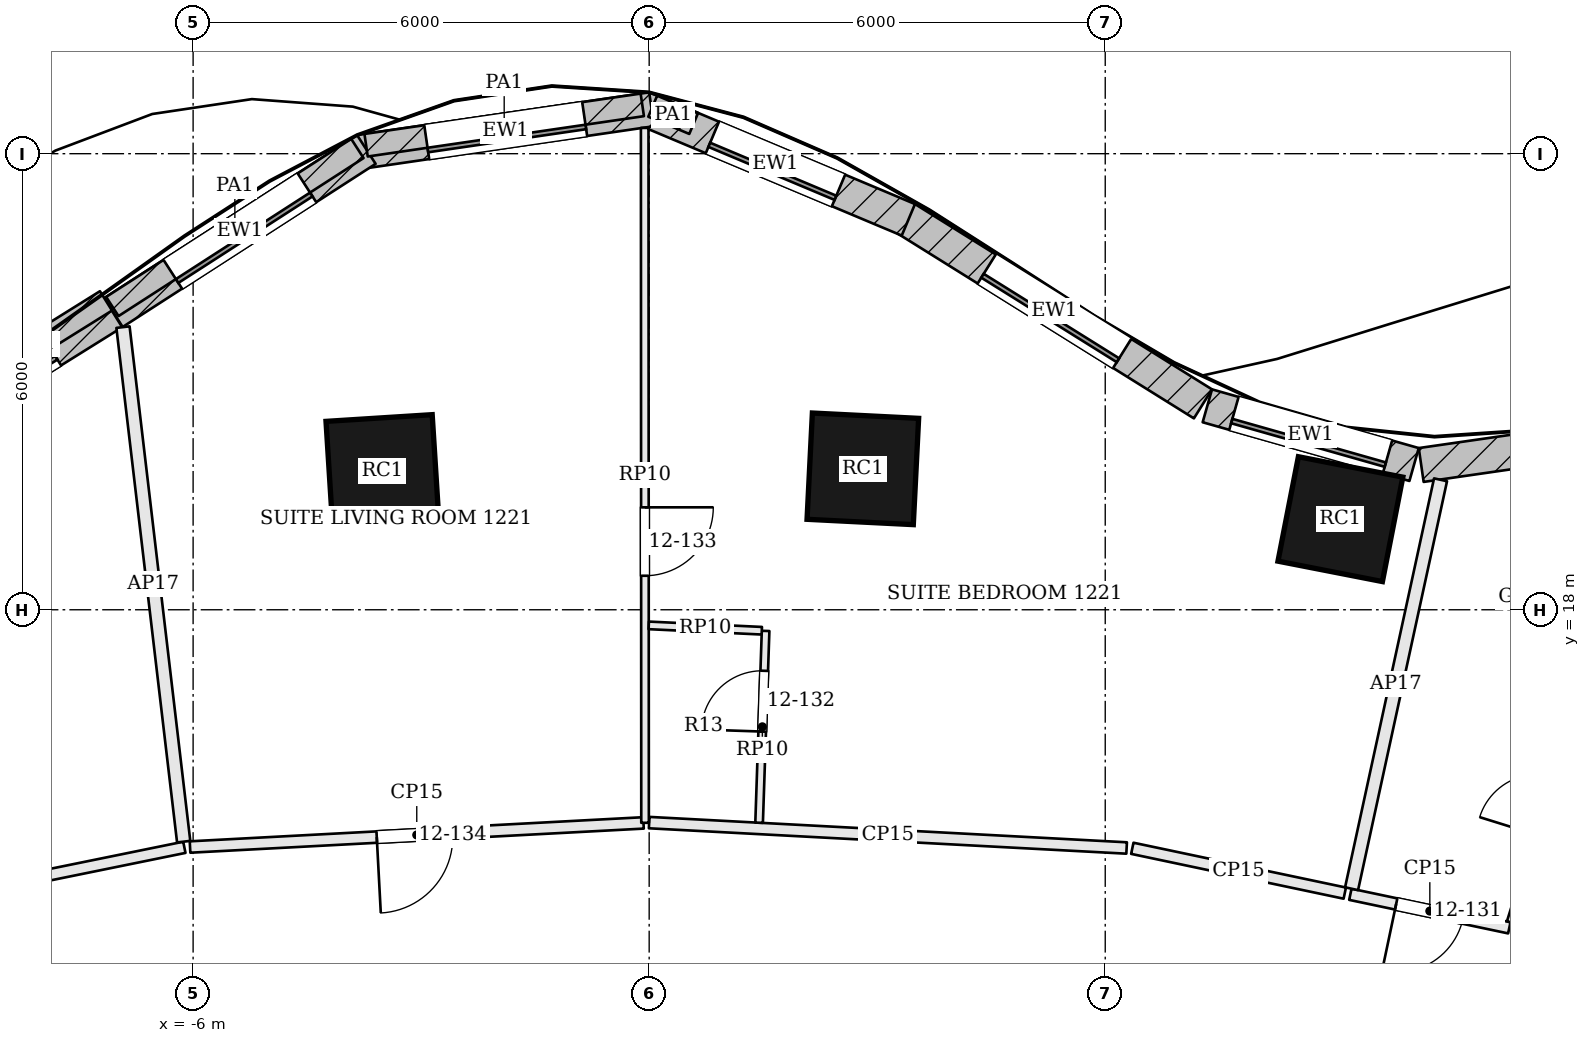
"""IFC4 building model, lengths in metres.
Left out: names, types, materials, properties, quantities, classifications, styles, units other than length and angle.
Written with IfcOpenShell. Run it as: python <this file> out.ifc"""

import sys

from ifc_helpers import new_model, si_unit, direction, frame, frame_2d, origin, origin_2d, place, context, subcontext, project, spatial, rectangle, extrude, element, fill, save


model = new_model("IFC4")
c1 = context("Model", 3, precision=1e-05, world=origin(), true_north=direction((0.0, 1.0)))
c2 = subcontext(c1, "Body", "Model", "MODEL_VIEW")
j1 = project(units=[si_unit("LENGTHUNIT", "METRE"), si_unit("PLANEANGLEUNIT", "RADIAN")], contexts=[c1])
p1 = place(None, origin())
s1 = spatial("IfcSite", under=j1, at=p1, CompositionType="ELEMENT")
p2 = place(p1, origin())
s2 = spatial("IfcBuilding", under=s1, at=p2, CompositionType="ELEMENT")
p3 = place(p2, frame((0.0, 0.0, 59.1)))
s3 = spatial("IfcBuildingStorey", under=s2, at=p3, CompositionType="ELEMENT", Elevation=59.1)
for number, where, z_axis, x_axis in (
    (1, (9.094, 19.192, 0.0), (0.0, 0.0, 1.0), (-0.981, 0.192, 0.0)),
    (2, (2.811, 19.854, 0.0), (0.0, 0.0, 1.0), (-0.999, 0.05, 0.0)),
    (3, (-3.509, 19.824, 0.0), (0.0, 0.0, 1.0), (-0.998, -0.063, 0.0)),
):
    element("IfcColumn", number, at=place(p3, frame(where, z_axis=z_axis, x_axis=x_axis)), inside=s3, PredefinedType="COLUMN", context=c2, shape_type="SweptSolid", body=[
        extrude(rectangle(XDim=1.4, YDim=1.4, at=origin_2d()), origin(), (0.0, 0.0, 1.0), 3.6),
    ])
p4 = place(p3, frame((15.752, 20.711, 0.0), z_axis=(0.0, 0.0, 1.0), x_axis=(-0.989761192351, -0.142733255115, 0.0)))
e4 = element("IfcWall", 4, at=p4, inside=s3, PredefinedType="SOLIDWALL", context=c2, shape_type="SweptSolid", body=[
    extrude(rectangle(XDim=5.653, YDim=0.45, at=frame_2d((2.827, 0.0))), origin(), (0.0, 0.0, 1.0), 3.4),
])
p5 = place(p4, frame((1.777, 0.0, 0.9)))
e5 = element("IfcOpeningElement", 5, at=p5, cuts=e4, PredefinedType="OPENING", context=c2, shape_type="SweptSolid", body=[
    extrude(rectangle(XDim=2.1, YDim=2.0, at=frame_2d((1.05, 1.0))), frame((0.0, 0.235, 0.0), z_axis=(0.0, -1.0, 0.0), x_axis=(1.0, 0.0, 0.0)), (0.0, 0.0, 1.0), 0.47),
])
p6 = place(p3, frame((10.063, 19.911, 0.0), z_axis=(0.0, 0.0, 1.0), x_axis=(-0.961982029567, 0.273112751057, 0.0)))
e6 = element("IfcWall", 6, at=p6, inside=s3, PredefinedType="SOLIDWALL", context=c2, shape_type="SweptSolid", body=[
    extrude(rectangle(XDim=2.827, YDim=0.45, at=frame_2d((1.414, 0.0))), origin(), (0.0, 0.0, 1.0), 3.4),
])
p7 = place(p6, frame((0.364, 0.0, 0.9)))
e7 = element("IfcOpeningElement", 7, at=p7, cuts=e6, PredefinedType="OPENING", context=c2, shape_type="SweptSolid", body=[
    extrude(rectangle(XDim=2.1, YDim=2.0, at=frame_2d((1.05, 1.0))), frame((0.0, 0.235, 0.0), z_axis=(0.0, -1.0, 0.0), x_axis=(1.0, 0.0, 0.0)), (0.0, 0.0, 1.0), 0.47),
])
p8 = place(p3, frame((7.286, 20.708, 0.0), z_axis=(0.0, 0.0, 1.0), x_axis=(-0.848420894374, 0.529322194878, 0.0)))
e8 = element("IfcWall", 8, at=p8, inside=s3, PredefinedType="SOLIDWALL", context=c2, shape_type="SweptSolid", body=[
    extrude(rectangle(XDim=4.606, YDim=0.45, at=frame_2d((2.303, 0.0))), origin(), (0.0, 0.0, 1.0), 3.4),
])
p9 = place(p8, frame((1.253, 0.0, 0.9)))
e9 = element("IfcOpeningElement", 9, at=p9, cuts=e8, PredefinedType="OPENING", context=c2, shape_type="SweptSolid", body=[
    extrude(rectangle(XDim=2.1, YDim=2.0, at=frame_2d((1.05, 1.0))), frame((0.0, 0.235, 0.0), z_axis=(0.0, -1.0, 0.0), x_axis=(1.0, 0.0, 0.0)), (0.0, 0.0, 1.0), 0.47),
])
p10 = place(p3, frame((3.41, 23.13, 0.0), z_axis=(0.0, 0.0, 1.0), x_axis=(-0.921914994676, 0.387392233521, 0.0)))
e10 = element("IfcWall", 10, at=p10, inside=s3, PredefinedType="SOLIDWALL", context=c2, shape_type="SweptSolid", body=[
    extrude(rectangle(XDim=3.793, YDim=0.45, at=frame_2d((1.896, 0.0))), origin(), (0.0, 0.0, 1.0), 3.4),
])
p11 = place(p10, frame((0.997, 0.0, 0.9)))
e11 = element("IfcOpeningElement", 11, at=p11, cuts=e10, PredefinedType="OPENING", context=c2, shape_type="SweptSolid", body=[
    extrude(rectangle(XDim=1.8, YDim=2.0, at=frame_2d((0.9, 1.0))), frame((0.0, 0.235, 0.0), z_axis=(0.0, -1.0, 0.0), x_axis=(1.0, 0.0, 0.0)), (0.0, 0.0, 1.0), 0.47),
])
p12 = place(p3, frame((0.032, 24.584, 0.0), z_axis=(0.0, 0.0, 1.0), x_axis=(-0.989495330387, -0.144564833698, 0.0)))
e12 = element("IfcWall", 12, at=p12, inside=s3, PredefinedType="SOLIDWALL", context=c2, shape_type="SweptSolid", body=[
    extrude(rectangle(XDim=3.881, YDim=0.45, at=frame_2d((1.94, 0.0))), origin(), (0.0, 0.0, 1.0), 3.4),
])
p13 = place(p12, frame((0.89, 0.0, 0.9)))
e13 = element("IfcOpeningElement", 13, at=p13, cuts=e12, PredefinedType="OPENING", context=c2, shape_type="SweptSolid", body=[
    extrude(rectangle(XDim=2.1, YDim=2.0, at=frame_2d((1.05, 1.0))), frame((0.0, 0.235, 0.0), z_axis=(0.0, -1.0, 0.0), x_axis=(1.0, 0.0, 0.0)), (0.0, 0.0, 1.0), 0.47),
])
p14 = place(p3, frame((-3.721, 24.055, 0.0), z_axis=(0.0, 0.0, 1.0), x_axis=(-0.840404438766, -0.54195975801, 0.0)))
e14 = element("IfcWall", 14, at=p14, inside=s3, PredefinedType="SOLIDWALL", context=c2, shape_type="SweptSolid", body=[
    extrude(rectangle(XDim=3.96, YDim=0.45, at=frame_2d((1.98, 0.0))), origin(), (0.0, 0.0, 1.0), 3.4),
])
p15 = place(p14, frame((0.93, 0.0, 0.9)))
e15 = element("IfcOpeningElement", 15, at=p15, cuts=e14, PredefinedType="OPENING", context=c2, shape_type="SweptSolid", body=[
    extrude(rectangle(XDim=2.1, YDim=2.0, at=frame_2d((1.05, 1.0))), frame((0.0, 0.235, 0.0), z_axis=(0.0, -1.0, 0.0), x_axis=(1.0, 0.0, 0.0)), (0.0, 0.0, 1.0), 0.47),
])
p16 = place(p3, frame((-7.052, 21.907, 0.0), z_axis=(0.0, 0.0, 1.0), x_axis=(-0.848498976054, -0.529197021566, 0.0)))
e16 = element("IfcWall", 16, at=p16, inside=s3, PredefinedType="SOLIDWALL", context=c2, shape_type="SweptSolid", body=[
    extrude(rectangle(XDim=3.997, YDim=0.45, at=frame_2d((1.998, 0.0))), origin(), (0.0, 0.0, 1.0), 3.4),
])
p17 = place(p16, frame((0.948, 0.0, 0.9)))
e17 = element("IfcOpeningElement", 17, at=p17, cuts=e16, PredefinedType="OPENING", context=c2, shape_type="SweptSolid", body=[
    extrude(rectangle(XDim=2.1, YDim=2.0, at=frame_2d((1.05, 1.0))), frame((0.0, 0.235, 0.0), z_axis=(0.0, -1.0, 0.0), x_axis=(1.0, 0.0, 0.0)), (0.0, 0.0, 1.0), 0.47),
])
p18 = place(p3, frame((0.586, 24.398, 3.6), z_axis=(0.0, 0.0, 1.0), x_axis=(-0.921949320844, 0.387310534062, 0.0)))
e18 = element("IfcWall", 18, at=p18, inside=s3, PredefinedType="PARAPET", context=c2, shape_type="SweptSolid", body=[
    extrude(rectangle(XDim=0.585, YDim=0.3, at=frame_2d((0.292, 0.0))), origin(), (0.0, 0.0, 1.0), 1.1),
])
p19 = place(p3, frame((-0.091, 24.642, 3.6), z_axis=(0.0, 0.0, 1.0), x_axis=(-0.989499132051, -0.144538810259, 0.0)))
e19 = element("IfcWall", 19, at=p19, inside=s3, PredefinedType="PARAPET", context=c2, shape_type="SweptSolid", body=[
    extrude(rectangle(XDim=3.672, YDim=0.3, at=frame_2d((1.836, 0.0))), origin(), (0.0, 0.0, 1.0), 1.1),
])
p20 = place(p3, frame((-3.839, 24.068, 3.6), z_axis=(0.0, 0.0, 1.0), x_axis=(-0.84044157539, -0.541902166776, 0.0)))
e20 = element("IfcWall", 20, at=p20, inside=s3, PredefinedType="PARAPET", context=c2, shape_type="SweptSolid", body=[
    extrude(rectangle(XDim=3.836, YDim=0.3, at=frame_2d((1.918, 0.0))), origin(), (0.0, 0.0, 1.0), 1.1),
])
p21 = place(p3, frame((-7.146, 22.064, 3.6), z_axis=(0.0, 0.0, 1.0), x_axis=(-0.848488829337, -0.529213290168, 0.0)))
e21 = element("IfcWall", 21, at=p21, inside=s3, PredefinedType="PARAPET", context=c2, shape_type="SweptSolid", body=[
    extrude(rectangle(XDim=2.124, YDim=0.3, at=frame_2d((1.062, 0.0))), origin(), (0.0, 0.0, 1.0), 1.1),
])
p22 = place(p3, frame((-6.115, 14.875, 0.0), z_axis=(0.0, 0.0, 1.0), x_axis=(-0.979873098531, -0.199621418629, 0.0)))
e22 = element("IfcWall", 22, at=p22, inside=s3, PredefinedType="PARTITIONING", context=c2, shape_type="SweptSolid", body=[
    extrude(rectangle(XDim=5.383, YDim=0.15, at=frame_2d((2.691, 0.0))), origin(), (0.0, 0.0, 1.0), 2.68),
])
p23 = place(p3, frame((-6.923, 21.718, 0.0), z_axis=(0.0, 0.0, 1.0), x_axis=(0.117163366321, -0.993112655036, 0.0)))
e23 = element("IfcWall", 23, at=p23, inside=s3, PredefinedType="PARTITIONING", context=c2, shape_type="SweptSolid", body=[
    extrude(rectangle(XDim=6.816, YDim=0.175, at=frame_2d((3.408, 0.0))), origin(), (0.0, 0.0, 1.0), 2.68),
])
p24 = place(p3, frame((11.316, 13.815, 0.0), z_axis=(0.0, 0.0, 1.0), x_axis=(-0.978461212154, 0.206430754275, 0.0)))
e24 = element("IfcWall", 24, at=p24, inside=s3, PredefinedType="PARTITIONING", context=c2, shape_type="SweptSolid", body=[
    extrude(rectangle(XDim=2.137, YDim=0.15, at=frame_2d((1.069, 0.0))), origin(), (0.0, 0.0, 1.0), 2.68),
])
p25 = place(p24, frame((0.621, 0.0, 0.0)))
e25 = element("IfcOpeningElement", 25, at=p25, cuts=e24, PredefinedType="OPENING", context=c2, shape_type="SweptSolid", body=[
    extrude(rectangle(XDim=0.9, YDim=2.4, at=frame_2d((0.45, 1.2))), frame((0.0, 0.085, 0.0), z_axis=(0.0, -1.0, 0.0), x_axis=(1.0, 0.0, 0.0)), (0.0, 0.0, 1.0), 0.17),
])
p26 = place(p3, frame((10.411, 19.71, 0.0), z_axis=(0.0, 0.0, 1.0), x_axis=(-0.212613726561, -0.977136327888, 0.0)))
e26 = element("IfcWall", 26, at=p26, inside=s3, PredefinedType="PARTITIONING", context=c2, shape_type="SweptSolid", body=[
    extrude(rectangle(XDim=5.506, YDim=0.175, at=frame_2d((2.753, 0.0))), origin(), (0.0, 0.0, 1.0), 2.68),
])
p27 = place(p3, frame((9.152, 14.272, 0.0), z_axis=(0.0, 0.0, 1.0), x_axis=(-0.978472647326, 0.206376545266, 0.0)))
e27 = element("IfcWall", 27, at=p27, inside=s3, PredefinedType="PARTITIONING", context=c2, shape_type="SweptSolid", body=[
    extrude(rectangle(XDim=2.857, YDim=0.15, at=frame_2d((1.428, 0.0))), origin(), (0.0, 0.0, 1.0), 2.68),
])
p28 = place(p3, frame((6.281, 14.866, 0.0), z_axis=(0.0, 0.0, 1.0), x_axis=(-0.998587429539, 0.053133281163, 0.0)))
e28 = element("IfcWall", 28, at=p28, inside=s3, PredefinedType="PARTITIONING", context=c2, shape_type="SweptSolid", body=[
    extrude(rectangle(XDim=6.29, YDim=0.15, at=frame_2d((3.145, 0.0))), origin(), (0.0, 0.0, 1.0), 2.68),
])
p29 = place(p3, frame((-0.075, 15.196, 0.0), z_axis=(0.0, 0.0, 1.0), x_axis=(-0.998589803119, -0.05308865328, 0.0)))
e29 = element("IfcWall", 29, at=p29, inside=s3, PredefinedType="PARTITIONING", context=c2, shape_type="SweptSolid", body=[
    extrude(rectangle(XDim=5.974, YDim=0.15, at=frame_2d((2.987, 0.0))), origin(), (0.0, 0.0, 1.0), 2.68),
])
p30 = place(p29, frame((2.514, 0.0, 0.0)))
e30 = element("IfcOpeningElement", 30, at=p30, cuts=e29, PredefinedType="OPENING", context=c2, shape_type="SweptSolid", body=[
    extrude(rectangle(XDim=1.0, YDim=2.1, at=frame_2d((0.5, 1.05))), frame((0.0, 0.085, 0.0), z_axis=(0.0, -1.0, 0.0), x_axis=(1.0, 0.0, 0.0)), (0.0, 0.0, 1.0), 0.17),
])
p31 = place(p3, frame((11.333, 13.888, 0.0), z_axis=(0.0, 0.0, 1.0), x_axis=(0.297311415603, 0.954780562303, 0.0)))
e31 = element("IfcWall", 31, at=p31, inside=s3, PredefinedType="PARTITIONING", context=c2, shape_type="SweptSolid", body=[
    extrude(rectangle(XDim=2.525, YDim=0.1, at=frame_2d((1.263, 0.0))), origin(), (0.0, 0.0, 1.0), 2.898),
])
p32 = place(p31, frame((1.2, 0.0, 0.0)))
e32 = element("IfcOpeningElement", 32, at=p32, cuts=e31, PredefinedType="OPENING", context=c2, shape_type="SweptSolid", body=[
    extrude(rectangle(XDim=0.8, YDim=2.1, at=frame_2d((0.4, 1.05))), frame((0.0, 0.06, 0.0), z_axis=(0.0, -1.0, 0.0), x_axis=(1.0, 0.0, 0.0)), (0.0, 0.0, 1.0), 0.12),
])
p33 = place(p3, frame((-0.059, 24.339, 0.0), z_axis=(0.0, 0.0, 1.0), x_axis=(0.000507383704, -0.999999871281, 0.0)))
e33 = element("IfcWall", 33, at=p33, inside=s3, PredefinedType="PARTITIONING", context=c2, shape_type="SweptSolid", body=[
    extrude(rectangle(XDim=9.142, YDim=0.1, at=frame_2d((4.571, 0.0))), origin(), (0.0, 0.0, 1.0), 2.898),
])
p34 = place(p33, frame((4.992, 0.0, 0.0)))
e34 = element("IfcOpeningElement", 34, at=p34, cuts=e33, PredefinedType="OPENING", context=c2, shape_type="SweptSolid", body=[
    extrude(rectangle(XDim=0.9, YDim=2.4, at=frame_2d((0.45, 1.2))), frame((0.0, 0.06, 0.0), z_axis=(0.0, -1.0, 0.0), x_axis=(1.0, 0.0, 0.0)), (0.0, 0.0, 1.0), 0.12),
])
p35 = place(p3, frame((1.446, 15.198, 0.0), z_axis=(0.0, 0.0, 1.0), x_axis=(0.033742987288, 0.999430543264, 0.0)))
e35 = element("IfcWall", 35, at=p35, inside=s3, PredefinedType="PARTITIONING", context=c2, shape_type="SweptSolid", body=[
    extrude(rectangle(XDim=2.525, YDim=0.1, at=frame_2d((1.263, 0.0))), origin(), (0.0, 0.0, 1.0), 2.898),
])
p36 = place(p35, frame((1.2, 0.0, 0.0)))
e36 = element("IfcOpeningElement", 36, at=p36, cuts=e35, PredefinedType="OPENING", context=c2, shape_type="SweptSolid", body=[
    extrude(rectangle(XDim=0.8, YDim=2.1, at=frame_2d((0.4, 1.05))), frame((0.0, 0.06, 0.0), z_axis=(0.0, -1.0, 0.0), x_axis=(1.0, 0.0, 0.0)), (0.0, 0.0, 1.0), 0.12),
])
p37 = place(p3, frame((1.482, 17.724, 0.0), z_axis=(0.0, 0.0, 1.0), x_axis=(-0.998876653786, 0.047385973891, 0.0)))
e37 = element("IfcWall", 37, at=p37, inside=s3, PredefinedType="PARTITIONING", context=c2, shape_type="SweptSolid", body=[
    extrude(rectangle(XDim=1.489, YDim=0.1, at=frame_2d((0.745, 0.0))), origin(), (0.0, 0.0, 1.0), 2.898),
])
p38 = place(p7, origin())
e38 = element("IfcWindow", 38, at=p38, inside=s3, PartitioningType="SINGLE_PANEL", PredefinedType="WINDOW", context=c2, shape_type="SweptSolid", body=[
    extrude(rectangle(XDim=2.1, YDim=2.0, at=frame_2d((1.05, 1.0))), frame((0.0, 0.135, 0.0), z_axis=(0.0, -1.0, 0.0), x_axis=(1.0, 0.0, 0.0)), (0.0, 0.0, 1.0), 0.06),
])
fill(e7, e38)
p39 = place(p9, origin())
e39 = element("IfcWindow", 39, at=p39, inside=s3, PartitioningType="SINGLE_PANEL", PredefinedType="WINDOW", context=c2, shape_type="SweptSolid", body=[
    extrude(rectangle(XDim=2.1, YDim=2.0, at=frame_2d((1.05, 1.0))), frame((0.0, 0.135, 0.0), z_axis=(0.0, -1.0, 0.0), x_axis=(1.0, 0.0, 0.0)), (0.0, 0.0, 1.0), 0.06),
])
fill(e9, e39)
p40 = place(p11, origin())
e40 = element("IfcWindow", 40, at=p40, inside=s3, PartitioningType="SINGLE_PANEL", PredefinedType="WINDOW", context=c2, shape_type="SweptSolid", body=[
    extrude(rectangle(XDim=1.8, YDim=2.0, at=frame_2d((0.9, 1.0))), frame((0.0, 0.135, 0.0), z_axis=(0.0, -1.0, 0.0), x_axis=(1.0, 0.0, 0.0)), (0.0, 0.0, 1.0), 0.06),
])
fill(e11, e40)
p41 = place(p13, origin())
e41 = element("IfcWindow", 41, at=p41, inside=s3, PartitioningType="SINGLE_PANEL", PredefinedType="WINDOW", context=c2, shape_type="SweptSolid", body=[
    extrude(rectangle(XDim=2.1, YDim=2.0, at=frame_2d((1.05, 1.0))), frame((0.0, 0.135, 0.0), z_axis=(0.0, -1.0, 0.0), x_axis=(1.0, 0.0, 0.0)), (0.0, 0.0, 1.0), 0.06),
])
fill(e13, e41)
p42 = place(p15, origin())
e42 = element("IfcWindow", 42, at=p42, inside=s3, PartitioningType="SINGLE_PANEL", PredefinedType="WINDOW", context=c2, shape_type="SweptSolid", body=[
    extrude(rectangle(XDim=2.1, YDim=2.0, at=frame_2d((1.05, 1.0))), frame((0.0, 0.135, 0.0), z_axis=(0.0, -1.0, 0.0), x_axis=(1.0, 0.0, 0.0)), (0.0, 0.0, 1.0), 0.06),
])
fill(e15, e42)
p43 = place(p17, origin())
e43 = element("IfcWindow", 43, at=p43, inside=s3, PartitioningType="SINGLE_PANEL", PredefinedType="WINDOW", context=c2, shape_type="SweptSolid", body=[
    extrude(rectangle(XDim=2.1, YDim=2.0, at=frame_2d((1.05, 1.0))), frame((0.0, 0.135, 0.0), z_axis=(0.0, -1.0, 0.0), x_axis=(1.0, 0.0, 0.0)), (0.0, 0.0, 1.0), 0.06),
])
fill(e17, e43)
p44 = place(p25, origin())
e44 = element("IfcDoor", 44, at=p44, inside=s3, OperationType="SINGLE_SWING_RIGHT", PredefinedType="DOOR", context=c2, shape_type="SweptSolid", body=[
    extrude(rectangle(XDim=0.9, YDim=2.4, at=frame_2d((0.45, 1.2))), frame((0.0, 0.025, 0.0), z_axis=(0.0, -1.0, 0.0), x_axis=(1.0, 0.0, 0.0)), (0.0, 0.0, 1.0), 0.05),
])
fill(e25, e44)
p45 = place(p36, origin())
e45 = element("IfcDoor", 45, at=p45, inside=s3, OperationType="SINGLE_SWING_LEFT", PredefinedType="DOOR", context=c2, shape_type="SweptSolid", body=[
    extrude(rectangle(XDim=0.8, YDim=2.1, at=frame_2d((0.4, 1.05))), frame((0.0, 0.025, 0.0), z_axis=(0.0, -1.0, 0.0), x_axis=(1.0, 0.0, 0.0)), (0.0, 0.0, 1.0), 0.05),
])
fill(e36, e45)
p46 = place(p34, origin())
e46 = element("IfcDoor", 46, at=p46, inside=s3, OperationType="SINGLE_SWING_LEFT", PredefinedType="DOOR", context=c2, shape_type="SweptSolid", body=[
    extrude(rectangle(XDim=0.9, YDim=2.4, at=frame_2d((0.45, 1.2))), frame((0.0, 0.025, 0.0), z_axis=(0.0, -1.0, 0.0), x_axis=(1.0, 0.0, 0.0)), (0.0, 0.0, 1.0), 0.05),
])
fill(e34, e46)
p47 = place(p30, origin())
e47 = element("IfcDoor", 47, at=p47, inside=s3, OperationType="SINGLE_SWING_RIGHT", PredefinedType="DOOR", context=c2, shape_type="SweptSolid", body=[
    extrude(rectangle(XDim=1.0, YDim=2.1, at=frame_2d((0.5, 1.05))), frame((0.0, 0.025, 0.0), z_axis=(0.0, -1.0, 0.0), x_axis=(1.0, 0.0, 0.0)), (0.0, 0.0, 1.0), 0.05),
])
fill(e30, e47)
save(model, sys.argv[1])
